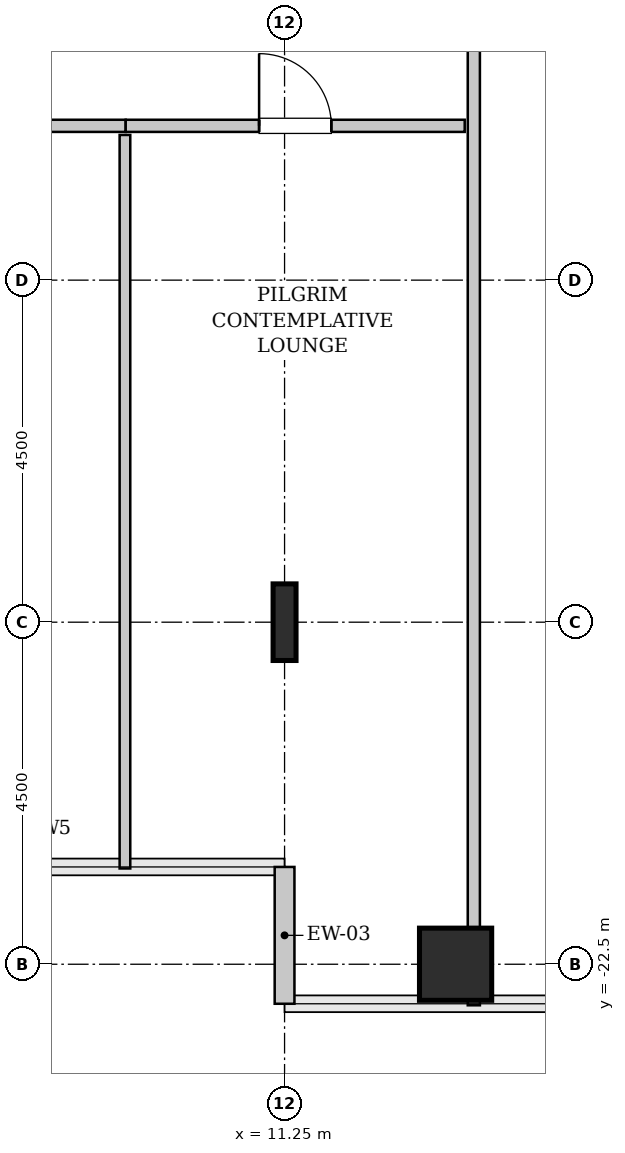
"""IFC4 building model, lengths in metres.
Left out: names, types, materials, properties, quantities, classifications, styles, units other than length and angle.
Written with IfcOpenShell. Run it as: python <this file> out.ifc"""

import sys

from ifc_helpers import new_model, si_unit, direction, frame, frame_2d, origin, origin_2d, place, context, subcontext, project, spatial, rectangle, hollow_rectangle, i_section, extrude, source, transform, mapped, element, fill, save


model = new_model("IFC4")
c1 = context("Model", 3, precision=1e-05, world=origin(), true_north=direction((0.0, 1.0)))
c2 = subcontext(c1, "Body", "Model", "MODEL_VIEW")
j1 = project(units=[si_unit("LENGTHUNIT", "METRE"), si_unit("PLANEANGLEUNIT", "RADIAN")], contexts=[c1])
p1 = place(None, origin())
s1 = spatial("IfcSite", under=j1, at=p1, CompositionType="ELEMENT")
p2 = place(p1, origin())
s2 = spatial("IfcBuilding", under=s1, at=p2, CompositionType="ELEMENT")
p3 = place(p2, frame((0.0, 0.0, 82.4)))
s3 = spatial("IfcBuildingStorey", under=s2, at=p3, CompositionType="ELEMENT", Elevation=82.4)
m1 = source(origin(), c2, "Body", "SweptSolid", [
    extrude(i_section(OverallWidth=0.302, OverallDepth=1.008, WebThickness=0.021, FlangeThickness=0.04, FilletRadius=0.03, at=origin_2d()), origin(), (0.0, 0.0, 1.0), 3.8),
])
p4 = place(p3, frame((11.25, -18.0, 0.0), z_axis=(0.0, 0.0, 1.0), x_axis=(1.0, 0.0, 0.0)))
e1 = element("IfcColumn", 1, at=p4, inside=s3, PredefinedType="COLUMN", context=c2, shape_type="MappedRepresentation", body=[
    mapped(m1, transform((0.0, 0.0, 0.0), x_axis=(1.0, 0.0, 0.0), y_axis=(0.0, 1.0, 0.0), z_axis=(0.0, 0.0, 1.0), scale=1.0)),
])
m2 = source(origin(), c2, "Body", "SweptSolid", [
    extrude(hollow_rectangle(XDim=0.95, YDim=0.95, WallThickness=0.045, InnerFilletRadius=0.045, OuterFilletRadius=0.09, at=origin_2d()), origin(), (0.0, 0.0, 1.0), 3.8),
])
p5 = place(p3, frame((13.5, -22.5, 0.0), z_axis=(0.0, 0.0, 1.0), x_axis=(1.0, 0.0, 0.0)))
e2 = element("IfcColumn", 2, at=p5, inside=s3, PredefinedType="COLUMN", context=c2, shape_type="MappedRepresentation", body=[
    mapped(m2, transform((0.0, 0.0, 0.0), x_axis=(1.0, 0.0, 0.0), y_axis=(0.0, 1.0, 0.0), z_axis=(0.0, 0.0, 1.0), scale=1.0)),
])
m3 = source(origin(), c2, "Body", "SweptSolid", [
    extrude(rectangle(XDim=1.8, YDim=0.26, at=frame_2d((0.9, 0.0))), origin(), (0.0, 0.0, 1.0), 3.5),
])
p6 = place(p3, frame((11.25, -21.22, 0.0), z_axis=(0.0, 0.0, 1.0), x_axis=(0.0, -1.0, 0.0)))
e3 = element("IfcWall", 3, at=p6, inside=s3, PredefinedType="SOLIDWALL", context=c2, shape_type="MappedRepresentation", body=[
    mapped(m3, transform((0.0, 0.0, 0.0), x_axis=(1.0, 0.0, 0.0), y_axis=(0.0, 1.0, 0.0), z_axis=(0.0, 0.0, 1.0), scale=1.0)),
])
m4 = source(origin(), c2, "Body", "SweptSolid", [
    extrude(rectangle(XDim=14.845, YDim=0.16, at=frame_2d((7.422, 0.0))), origin(), (0.0, 0.0, 1.0), 3.485),
])
p7 = place(p3, frame((13.74, -23.04, 0.0), z_axis=(0.0, 0.0, 1.0), x_axis=(0.0, 1.0, 0.0)))
e4 = element("IfcWall", 4, at=p7, inside=s3, PredefinedType="PARTITIONING", context=c2, shape_type="MappedRepresentation", body=[
    mapped(m4, transform((0.0, 0.0, 0.0), x_axis=(1.0, 0.0, 0.0), y_axis=(0.0, 1.0, 0.0), z_axis=(0.0, 0.0, 1.0), scale=1.0)),
])
p8 = place(p7, frame((12.712, 0.0, 0.0)))
e5 = element("IfcOpeningElement", 5, at=p8, cuts=e4, PredefinedType="OPENING", context=c2, shape_type="SweptSolid", body=[
    extrude(rectangle(XDim=0.95, YDim=2.1, at=frame_2d((0.475, 1.05))), frame((0.0, 0.09, 0.0), z_axis=(0.0, -1.0, 0.0), x_axis=(1.0, 0.0, 0.0)), (0.0, 0.0, 1.0), 0.18),
])
m5 = source(origin(), c2, "Body", "SweptSolid", [
    extrude(rectangle(XDim=4.565, YDim=0.16, at=frame_2d((2.282, 0.0))), origin(), (0.0, 0.0, 1.0), 3.485),
])
p9 = place(p3, frame((4.595, -11.47, 0.0), z_axis=(0.0, 0.0, 1.0), x_axis=(1.0, 0.0, 0.0)))
e6 = element("IfcWall", 6, at=p9, inside=s3, PredefinedType="PARTITIONING", context=c2, shape_type="MappedRepresentation", body=[
    mapped(m5, transform((0.0, 0.0, 0.0), x_axis=(1.0, 0.0, 0.0), y_axis=(0.0, 1.0, 0.0), z_axis=(0.0, 0.0, 1.0), scale=1.0)),
])
p10 = place(p9, frame((1.808, 0.0, 0.0)))
e7 = element("IfcOpeningElement", 7, at=p10, cuts=e6, PredefinedType="OPENING", context=c2, shape_type="SweptSolid", body=[
    extrude(rectangle(XDim=0.95, YDim=2.1, at=frame_2d((0.475, 1.05))), frame((0.0, 0.09, 0.0), z_axis=(0.0, -1.0, 0.0), x_axis=(1.0, 0.0, 0.0)), (0.0, 0.0, 1.0), 0.18),
])
m6 = source(origin(), c2, "Body", "SweptSolid", [
    extrude(rectangle(XDim=9.65, YDim=0.14, at=frame_2d((4.825, 0.0))), origin(), (0.0, 0.0, 1.0), 3.485),
])
p11 = place(p3, frame((9.15, -21.24, 0.0), z_axis=(0.0, 0.0, 1.0), x_axis=(0.0, 1.0, 0.0)))
e8 = element("IfcWall", 8, at=p11, inside=s3, PredefinedType="PARTITIONING", context=c2, shape_type="MappedRepresentation", body=[
    mapped(m6, transform((0.0, 0.0, 0.0), x_axis=(1.0, 0.0, 0.0), y_axis=(0.0, 1.0, 0.0), z_axis=(0.0, 0.0, 1.0), scale=1.0)),
])
m7 = source(origin(), c2, "Body", "SweptSolid", [
    extrude(rectangle(XDim=4.46, YDim=0.16, at=frame_2d((2.23, 0.0))), origin(), (0.0, 0.0, 1.0), 3.485),
])
p12 = place(p3, frame((9.16, -11.47, 0.0), z_axis=(0.0, 0.0, 1.0), x_axis=(1.0, 0.0, 0.0)))
e9 = element("IfcWall", 9, at=p12, inside=s3, PredefinedType="PARTITIONING", context=c2, shape_type="MappedRepresentation", body=[
    mapped(m7, transform((0.0, 0.0, 0.0), x_axis=(1.0, 0.0, 0.0), y_axis=(0.0, 1.0, 0.0), z_axis=(0.0, 0.0, 1.0), scale=1.0)),
])
p13 = place(p12, frame((1.755, 0.0, 0.0)))
e10 = element("IfcOpeningElement", 10, at=p13, cuts=e9, PredefinedType="OPENING", context=c2, shape_type="SweptSolid", body=[
    extrude(rectangle(XDim=0.95, YDim=2.1, at=frame_2d((0.475, 1.05))), frame((0.0, 0.09, 0.0), z_axis=(0.0, -1.0, 0.0), x_axis=(1.0, 0.0, 0.0)), (0.0, 0.0, 1.0), 0.18),
])
m8 = source(origin(), c2, "Body", "SweptSolid", [
    extrude(rectangle(XDim=0.95, YDim=2.1, at=frame_2d((0.475, 1.05))), frame((0.0, 0.025, 0.0), z_axis=(0.0, -1.0, 0.0), x_axis=(1.0, 0.0, 0.0)), (0.0, 0.0, 1.0), 0.05),
])
p14 = place(p13, origin())
e11 = element("IfcDoor", 11, at=p14, inside=s3, OperationType="SINGLE_SWING_LEFT", PredefinedType="DOOR", context=c2, shape_type="MappedRepresentation", body=[
    mapped(m8, transform((0.0, 0.0, 0.0), x_axis=(1.0, 0.0, 0.0), y_axis=(0.0, 1.0, 0.0), z_axis=(0.0, 0.0, 1.0), scale=1.0)),
])
fill(e10, e11)
save(model, sys.argv[1])
